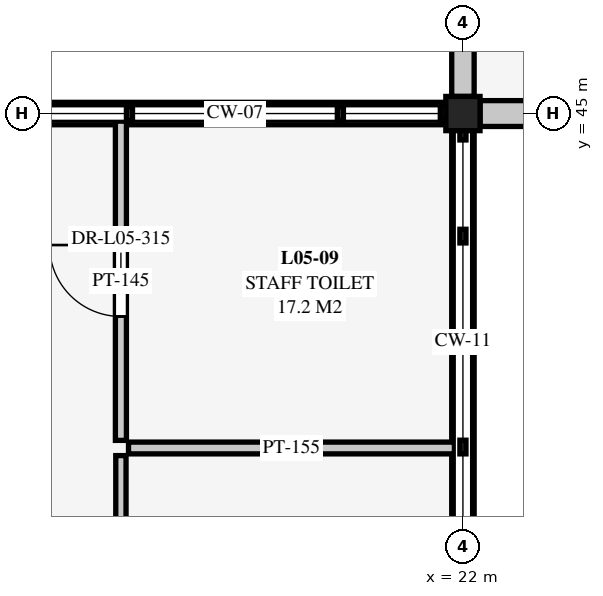
"""IFC4 building model, lengths in metres.
Left out: names, types, materials, properties, quantities, classifications, styles, units other than length and angle.
Written with IfcOpenShell. Run it as: python <this file> out.ifc"""

import sys

from ifc_helpers import new_model, si_unit, direction, frame, frame_2d, origin, origin_2d, place, context, subcontext, project, spatial, rectangle, extrude, element, fill, save


model = new_model("IFC4")
c1 = context("Model", 3, precision=1e-05, world=origin(), true_north=direction((0.0, 1.0)))
c2 = subcontext(c1, "Body", "Model", "MODEL_VIEW")
j1 = project(units=[si_unit("LENGTHUNIT", "METRE"), si_unit("PLANEANGLEUNIT", "RADIAN")], contexts=[c1])
p1 = place(None, origin())
s1 = spatial("IfcSite", under=j1, at=p1, CompositionType="ELEMENT")
p2 = place(p1, origin())
s2 = spatial("IfcBuilding", under=s1, at=p2, CompositionType="ELEMENT")
p3 = place(p2, frame((0.0, 0.0, 18.0)))
s3 = spatial("IfcBuildingStorey", under=s2, at=p3, CompositionType="ELEMENT", Elevation=18.0)
p4 = place(p3, frame((22.0, 45.0, 0.0), z_axis=(0.0, 0.0, 1.0), x_axis=(1.0, 0.0, 0.0)))
e1 = element("IfcColumn", 1, at=p4, inside=s3, PredefinedType="COLUMN", context=c2, shape_type="SweptSolid", body=[
    extrude(rectangle(XDim=0.45, YDim=0.45, at=origin_2d()), origin(), (0.0, 0.0, 1.0), 4.5),
])
p5 = place(p3, frame((16.225, 45.0, 0.0), z_axis=(0.0, 0.0, 1.0), x_axis=(1.0, 0.0, 0.0)))
e2 = element("IfcWall", 2, at=p5, inside=s3, PredefinedType="SOLIDWALL", context=c2, shape_type="SweptSolid", body=[
    extrude(rectangle(XDim=5.55, YDim=0.295, at=frame_2d((2.775, 0.0))), origin(), (0.0, 0.0, 1.0), 0.46),
])
p6 = place(p3, frame((22.0, 44.775, 0.0), z_axis=(0.0, 0.0, 1.0), x_axis=(0.0, -1.0, 0.0)))
e3 = element("IfcWall", 3, at=p6, inside=s3, PredefinedType="SOLIDWALL", context=c2, shape_type="SweptSolid", body=[
    extrude(rectangle(XDim=5.55, YDim=0.295, at=frame_2d((2.775, 0.0))), origin(), (0.0, 0.0, 1.0), 0.26),
])
p7 = place(p3, frame((27.775, 45.0, 0.0), z_axis=(0.0, 0.0, 1.0), x_axis=(-1.0, 0.0, 0.0)))
e4 = element("IfcWall", 4, at=p7, inside=s3, PredefinedType="SOLIDWALL", context=c2, shape_type="SweptSolid", body=[
    extrude(rectangle(XDim=5.55, YDim=0.34, at=frame_2d((2.775, 0.0))), origin(), (0.0, 0.0, 1.0), 4.093),
])
p8 = place(p7, frame((2.15, 0.0, 0.8)))
e5 = element("IfcOpeningElement", 5, at=p8, cuts=e4, PredefinedType="OPENING", context=c2, shape_type="SweptSolid", body=[
    extrude(rectangle(XDim=1.25, YDim=2.15, at=frame_2d((0.625, 1.075))), frame((0.0, 0.18, 0.0), z_axis=(0.0, -1.0, 0.0), x_axis=(1.0, 0.0, 0.0)), (0.0, 0.0, 1.0), 0.36),
])
p9 = place(p3, frame((22.0, 45.225, 0.0), z_axis=(0.0, 0.0, 1.0), x_axis=(0.0, 1.0, 0.0)))
e6 = element("IfcWall", 6, at=p9, inside=s3, PredefinedType="SOLIDWALL", context=c2, shape_type="SweptSolid", body=[
    extrude(rectangle(XDim=5.55, YDim=0.295, at=frame_2d((2.775, 0.0))), origin(), (0.0, 0.0, 1.0), 4.093),
])
p10 = place(p9, frame((2.05, 0.0, 0.75)))
e7 = element("IfcOpeningElement", 7, at=p10, cuts=e6, PredefinedType="OPENING", context=c2, shape_type="SweptSolid", body=[
    extrude(rectangle(XDim=1.45, YDim=2.25, at=frame_2d((0.725, 1.125))), frame((0.0, 0.157, 0.0), z_axis=(0.0, -1.0, 0.0), x_axis=(1.0, 0.0, 0.0)), (0.0, 0.0, 1.0), 0.315),
])
p11 = place(p3, frame((17.5, 36.4, 0.0), z_axis=(0.0, 0.0, 1.0), x_axis=(0.0, 1.0, 0.0)))
e8 = element("IfcWall", 8, at=p11, inside=s3, PredefinedType="PARTITIONING", context=c2, shape_type="SweptSolid", body=[
    extrude(rectangle(XDim=4.1, YDim=0.135, at=frame_2d((2.05, 0.0))), origin(), (0.0, 0.0, 1.0), 4.24),
])
p12 = place(p3, frame((17.5, 40.7, 0.0), z_axis=(0.0, 0.0, 1.0), x_axis=(0.0, 1.0, 0.0)))
e9 = element("IfcWall", 9, at=p12, inside=s3, PredefinedType="PARTITIONING", context=c2, shape_type="SweptSolid", body=[
    extrude(rectangle(XDim=4.2, YDim=0.145, at=frame_2d((2.1, 0.0))), origin(), (0.0, 0.0, 1.0), 4.24),
])
p13 = place(p12, frame((1.63, 0.0, 0.0)))
e10 = element("IfcOpeningElement", 10, at=p13, cuts=e9, PredefinedType="OPENING", context=c2, shape_type="SweptSolid", body=[
    extrude(rectangle(XDim=0.94, YDim=2.1, at=frame_2d((0.47, 1.05))), frame((0.0, 0.083, 0.0), z_axis=(0.0, -1.0, 0.0), x_axis=(1.0, 0.0, 0.0)), (0.0, 0.0, 1.0), 0.165),
])
p14 = place(p3, frame((17.6, 40.6, 0.0), z_axis=(0.0, 0.0, 1.0), x_axis=(1.0, 0.0, 0.0)))
e11 = element("IfcWall", 11, at=p14, inside=s3, PredefinedType="PARTITIONING", context=c2, shape_type="SweptSolid", body=[
    extrude(rectangle(XDim=4.288, YDim=0.155, at=frame_2d((2.144, 0.0))), origin(), (0.0, 0.0, 1.0), 4.24),
])
p15 = place(p13, origin())
e12 = element("IfcDoor", 12, at=p15, inside=s3, OperationType="SINGLE_SWING_RIGHT", PredefinedType="DOOR", context=c2, shape_type="SweptSolid", body=[
    extrude(rectangle(XDim=0.94, YDim=2.1, at=frame_2d((0.47, 1.05))), frame((0.0, 0.025, 0.0), z_axis=(0.0, -1.0, 0.0), x_axis=(1.0, 0.0, 0.0)), (0.0, 0.0, 1.0), 0.05),
])
fill(e10, e12)
save(model, sys.argv[1])
